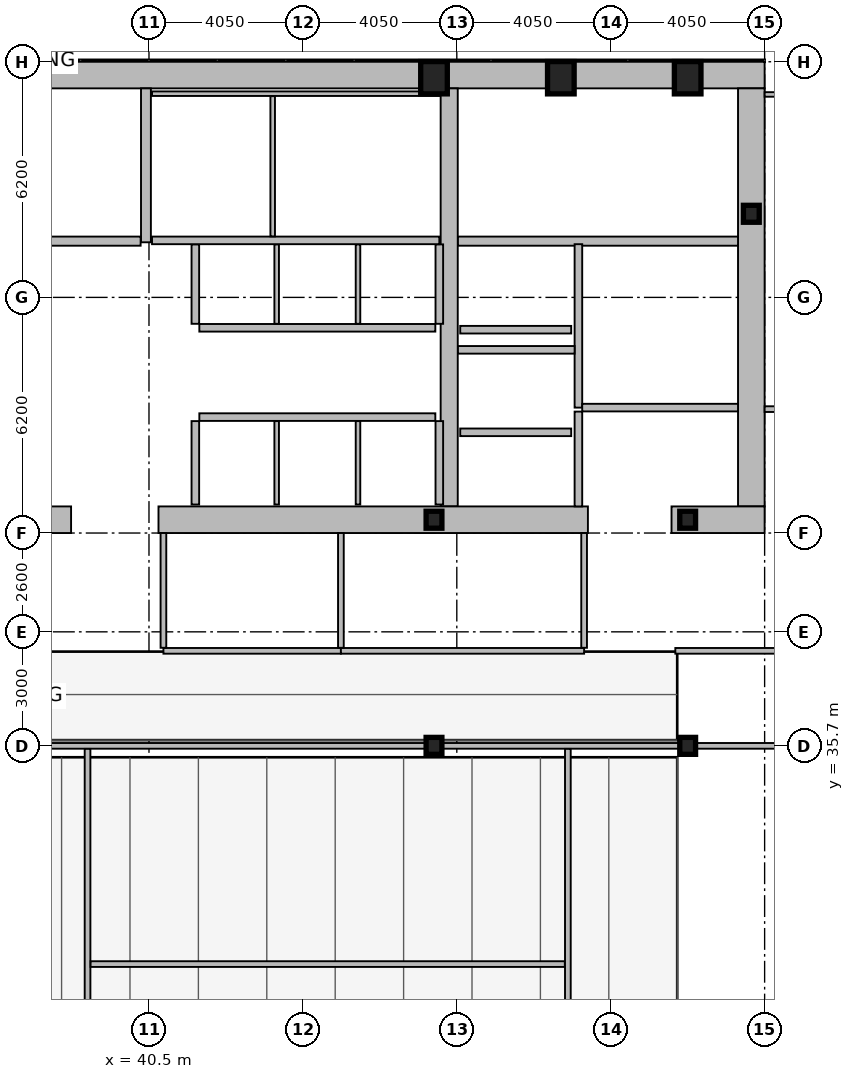
"""IFC4 building model, lengths in metres.
Left out: names, types, materials, properties, quantities, classifications, styles, units other than length and angle.
Written with IfcOpenShell. Run it as: python <this file> out.ifc"""

import sys

from ifc_helpers import new_model, si_unit, direction, frame, frame_2d, origin, origin_2d, place, context, subcontext, project, spatial, rectangle, hollow_rectangle, i_section, extrude, element, fill, save


model = new_model("IFC4")
c1 = context("Model", 3, precision=1e-05, world=origin(), true_north=direction((0.0, 1.0)))
c2 = subcontext(c1, "Body", "Model", "MODEL_VIEW")
j1 = project(units=[si_unit("LENGTHUNIT", "METRE"), si_unit("PLANEANGLEUNIT", "RADIAN")], contexts=[c1])
p1 = place(None, origin())
s1 = spatial("IfcSite", under=j1, at=p1, CompositionType="ELEMENT")
p2 = place(p1, origin())
s2 = spatial("IfcBuilding", under=s1, at=p2, CompositionType="ELEMENT")
p3 = place(p2, frame((0.0, 0.0, 154.2)))
s3 = spatial("IfcBuildingStorey", under=s2, at=p3, CompositionType="ELEMENT", Elevation=154.2)
p4 = place(p3, frame((16.2, 53.35, 0.0), z_axis=(0.0, 0.0, 1.0), x_axis=(1.0, 0.0, 0.0)))
e1 = element("IfcWall", 1, at=p4, inside=s3, PredefinedType="SHEAR", context=c2, shape_type="SweptSolid", body=[
    extrude(rectangle(XDim=40.5, YDim=0.7, at=frame_2d((20.25, 0.0))), origin(), (0.0, 0.0, 1.0), 3.44),
])
p5 = place(p3, frame((56.35, 53.0, 0.0), z_axis=(0.0, 0.0, 1.0), x_axis=(0.0, -1.0, 0.0)))
e2 = element("IfcWall", 2, at=p5, inside=s3, PredefinedType="SHEAR", context=c2, shape_type="SweptSolid", body=[
    extrude(rectangle(XDim=11.0, YDim=0.7, at=frame_2d((5.5, 0.0))), origin(), (0.0, 0.0, 1.0), 3.44),
])
p6 = place(p3, frame((48.4, 42.0, 0.0), z_axis=(0.0, 0.0, 1.0), x_axis=(0.0, 1.0, 0.0)))
e3 = element("IfcWall", 3, at=p6, inside=s3, PredefinedType="SHEAR", context=c2, shape_type="SweptSolid", body=[
    extrude(rectangle(XDim=11.0, YDim=0.45, at=frame_2d((5.5, 0.0))), origin(), (0.0, 0.0, 1.0), 3.44),
])
p7 = place(p3, frame((38.45, 41.65, 0.0), z_axis=(0.0, 0.0, 1.0), x_axis=(-1.0, 0.0, 0.0)))
e4 = element("IfcWall", 4, at=p7, inside=s3, PredefinedType="SHEAR", context=c2, shape_type="SweptSolid", body=[
    extrude(rectangle(XDim=3.75, YDim=0.7, at=frame_2d((1.875, 0.0))), origin(), (0.0, 0.0, 1.0), 3.44),
])
p8 = place(p3, frame((52.05, 41.65, 0.0), z_axis=(0.0, 0.0, 1.0), x_axis=(-1.0, 0.0, 0.0)))
e5 = element("IfcWall", 5, at=p8, inside=s3, PredefinedType="SHEAR", context=c2, shape_type="SweptSolid", body=[
    extrude(rectangle(XDim=11.3, YDim=0.7, at=frame_2d((5.65, 0.0))), origin(), (0.0, 0.0, 1.0), 3.44),
])
p9 = place(p3, frame((56.7, 41.65, 0.0), z_axis=(0.0, 0.0, 1.0), x_axis=(-1.0, 0.0, 0.0)))
e6 = element("IfcWall", 6, at=p9, inside=s3, PredefinedType="SHEAR", context=c2, shape_type="SweptSolid", body=[
    extrude(rectangle(XDim=2.45, YDim=0.7, at=frame_2d((1.225, 0.0))), origin(), (0.0, 0.0, 1.0), 3.44),
])
p10 = place(p3, frame((40.42, 48.95, 0.0), z_axis=(0.0, 0.0, 1.0), x_axis=(0.0, 1.0, 0.0)))
e7 = element("IfcWall", 7, at=p10, inside=s3, PredefinedType="SHEAR", context=c2, shape_type="SweptSolid", body=[
    extrude(rectangle(XDim=4.05, YDim=0.26, at=frame_2d((2.025, 0.0))), origin(), (0.0, 0.0, 1.0), 3.44),
])
p11 = place(p3, frame((48.63, 48.98, 0.0), z_axis=(0.0, 0.0, 1.0), x_axis=(1.0, 0.0, 0.0)))
e8 = element("IfcWall", 8, at=p11, inside=s3, PredefinedType="SHEAR", context=c2, shape_type="SweptSolid", body=[
    extrude(rectangle(XDim=7.37, YDim=0.24, at=frame_2d((3.685, 0.0))), origin(), (0.0, 0.0, 1.0), 3.44),
])
p12 = place(p11, frame((6.1, 0.0, 0.0)))
e9 = element("IfcOpeningElement", 9, at=p12, cuts=e8, PredefinedType="OPENING", context=c2, shape_type="SweptSolid", body=[
    extrude(rectangle(XDim=1.05, YDim=2.15, at=frame_2d((0.525, 1.075))), frame((0.0, 0.13, 0.0), z_axis=(0.0, -1.0, 0.0), x_axis=(1.0, 0.0, 0.0)), (0.0, 0.0, 1.0), 0.26),
])
p13 = place(p3, frame((32.72, 48.98, 0.0), z_axis=(0.0, 0.0, 1.0), x_axis=(1.0, 0.0, 0.0)))
e10 = element("IfcWall", 10, at=p13, inside=s3, PredefinedType="SHEAR", context=c2, shape_type="SweptSolid", body=[
    extrude(rectangle(XDim=7.56, YDim=0.24, at=frame_2d((3.78, 0.0))), origin(), (0.0, 0.0, 1.0), 3.44),
])
p14 = place(p13, frame((0.22, 0.0, 0.0)))
e11 = element("IfcOpeningElement", 11, at=p14, cuts=e10, PredefinedType="OPENING", context=c2, shape_type="SweptSolid", body=[
    extrude(rectangle(XDim=1.05, YDim=2.15, at=frame_2d((0.525, 1.075))), frame((0.0, 0.13, 0.0), z_axis=(0.0, -1.0, 0.0), x_axis=(1.0, 0.0, 0.0)), (0.0, 0.0, 1.0), 0.26),
])
for number, where, z_axis, x_axis in (
    (12, (48.0, 53.28, 0.0), (0.0, 0.0, 1.0), (1.0, 0.0, 0.0)),
    (13, (51.337, 53.28, 0.0), (0.0, 0.0, 1.0), (1.0, 0.0, 0.0)),
    (14, (54.675, 53.28, 0.0), (0.0, 0.0, 1.0), (1.0, 0.0, 0.0)),
):
    element("IfcColumn", number, at=place(p3, frame(where, z_axis=z_axis, x_axis=x_axis)), inside=s3, PredefinedType="COLUMN", context=c2, shape_type="SweptSolid", body=[
        extrude(hollow_rectangle(XDim=0.7, YDim=0.85, WallThickness=0.05, at=origin_2d()), origin(), (0.0, 0.0, 1.0), 3.6),
    ])
for number, where, z_axis, x_axis in (
    (15, (56.35, 49.7, 0.0), (0.0, 0.0, 1.0), (1.0, 0.0, 0.0)),
    (16, (48.0, 35.7, 0.0), (0.0, 0.0, 1.0), (1.0, 0.0, 0.0)),
    (17, (48.0, 41.65, 0.0), (0.0, 0.0, 1.0), (1.0, 0.0, 0.0)),
    (18, (54.675, 35.7, 0.0), (0.0, 0.0, 1.0), (1.0, 0.0, 0.0)),
    (19, (54.675, 41.65, 0.0), (0.0, 0.0, 1.0), (1.0, 0.0, 0.0)),
):
    element("IfcColumn", number, at=place(p3, frame(where, z_axis=z_axis, x_axis=x_axis)), inside=s3, PredefinedType="COLUMN", context=c2, shape_type="SweptSolid", body=[
        extrude(i_section(OverallWidth=0.416, OverallDepth=0.446, WebThickness=0.039, FlangeThickness=0.063, at=origin_2d()), origin(), (0.0, 0.0, 1.0), 3.6),
    ])
p15 = place(p3, frame((51.61, 43.95, 0.0), z_axis=(0.0, 0.0, 1.0), x_axis=(-1.0, 0.0, 0.0)))
e20 = element("IfcWall", 20, at=p15, inside=s3, PredefinedType="PARTITIONING", context=c2, shape_type="SweptSolid", body=[
    extrude(rectangle(XDim=2.92, YDim=0.2, at=frame_2d((1.46, 0.0))), origin(), (0.0, 0.0, 1.0), 3.44),
])
p16 = place(p15, frame((0.81, 0.0, 0.0)))
e21 = element("IfcOpeningElement", 21, at=p16, cuts=e20, PredefinedType="OPENING", context=c2, shape_type="SweptSolid", body=[
    extrude(rectangle(XDim=1.3, YDim=2.18, at=frame_2d((0.65, 1.09))), frame((0.0, 0.11, 0.0), z_axis=(0.0, -1.0, 0.0), x_axis=(1.0, 0.0, 0.0)), (0.0, 0.0, 1.0), 0.22),
])
p17 = place(p3, frame((51.61, 46.65, 0.0), z_axis=(0.0, 0.0, 1.0), x_axis=(-1.0, 0.0, 0.0)))
e22 = element("IfcWall", 22, at=p17, inside=s3, PredefinedType="PARTITIONING", context=c2, shape_type="SweptSolid", body=[
    extrude(rectangle(XDim=2.92, YDim=0.2, at=frame_2d((1.46, 0.0))), origin(), (0.0, 0.0, 1.0), 3.44),
])
p18 = place(p17, frame((0.86, 0.0, 0.0)))
e23 = element("IfcOpeningElement", 23, at=p18, cuts=e22, PredefinedType="OPENING", context=c2, shape_type="SweptSolid", body=[
    extrude(rectangle(XDim=1.2, YDim=2.18, at=frame_2d((0.6, 1.09))), frame((0.0, 0.11, 0.0), z_axis=(0.0, -1.0, 0.0), x_axis=(1.0, 0.0, 0.0)), (0.0, 0.0, 1.0), 0.22),
])
p19 = place(p3, frame((51.8, 44.6, 0.0), z_axis=(0.0, 0.0, 1.0), x_axis=(0.0, 1.0, 0.0)))
e24 = element("IfcWall", 24, at=p19, inside=s3, PredefinedType="PARTITIONING", context=c2, shape_type="SweptSolid", body=[
    extrude(rectangle(XDim=4.3, YDim=0.2, at=frame_2d((2.15, 0.0))), origin(), (0.0, 0.0, 1.0), 3.44),
])
p20 = place(p3, frame((51.9, 44.6, 0.0), z_axis=(0.0, 0.0, 1.0), x_axis=(1.0, 0.0, 0.0)))
e25 = element("IfcWall", 25, at=p20, inside=s3, PredefinedType="PARTITIONING", context=c2, shape_type="SweptSolid", body=[
    extrude(rectangle(XDim=4.1, YDim=0.2, at=frame_2d((2.05, 0.0))), origin(), (0.0, 0.0, 1.0), 3.44),
])
p21 = place(p20, frame((1.15, 0.0, 0.0)))
e26 = element("IfcOpeningElement", 26, at=p21, cuts=e25, PredefinedType="OPENING", context=c2, shape_type="SweptSolid", body=[
    extrude(rectangle(XDim=1.05, YDim=2.15, at=frame_2d((0.525, 1.075))), frame((0.0, 0.11, 0.0), z_axis=(0.0, -1.0, 0.0), x_axis=(1.0, 0.0, 0.0)), (0.0, 0.0, 1.0), 0.22),
])
p22 = place(p3, frame((48.63, 46.12, 0.0), z_axis=(0.0, 0.0, 1.0), x_axis=(1.0, 0.0, 0.0)))
e27 = element("IfcWall", 27, at=p22, inside=s3, PredefinedType="PARTITIONING", context=c2, shape_type="SweptSolid", body=[
    extrude(rectangle(XDim=3.07, YDim=0.2, at=frame_2d((1.535, 0.0))), origin(), (0.0, 0.0, 1.0), 3.44),
])
p23 = place(p3, frame((51.8, 42.0, 0.0), z_axis=(0.0, 0.0, 1.0), x_axis=(0.0, 1.0, 0.0)))
e28 = element("IfcWall", 28, at=p23, inside=s3, PredefinedType="PARTITIONING", context=c2, shape_type="SweptSolid", body=[
    extrude(rectangle(XDim=2.495, YDim=0.2, at=frame_2d((1.248, 0.0))), origin(), (0.0, 0.0, 1.0), 3.44),
])
p24 = place(p23, frame((0.38, 0.0, 0.0)))
e29 = element("IfcOpeningElement", 29, at=p24, cuts=e28, PredefinedType="OPENING", context=c2, shape_type="SweptSolid", body=[
    extrude(rectangle(XDim=1.05, YDim=2.15, at=frame_2d((0.525, 1.075))), frame((0.0, 0.11, 0.0), z_axis=(0.0, -1.0, 0.0), x_axis=(1.0, 0.0, 0.0)), (0.0, 0.0, 1.0), 0.22),
])
p25 = place(p3, frame((41.825, 46.7, 0.0), z_axis=(0.0, 0.0, 1.0), x_axis=(1.0, 0.0, 0.0)))
e30 = element("IfcWall", 30, at=p25, inside=s3, PredefinedType="PARTITIONING", context=c2, shape_type="SweptSolid", body=[
    extrude(rectangle(XDim=6.21, YDim=0.2, at=frame_2d((3.105, 0.0))), origin(), (0.0, 0.0, 1.0), 3.44),
])
for number, where, z_axis, x_axis in (
    (31, (41.72, 46.805, 0.0), (0.0, 0.0, 1.0), (0.0, 1.0, 0.0)),
    (32, (48.14, 46.805, 0.0), (0.0, 0.0, 1.0), (0.0, 1.0, 0.0)),
):
    element("IfcWall", number, at=place(p3, frame(where, z_axis=z_axis, x_axis=x_axis)), inside=s3, PredefinedType="PARTITIONING", context=c2, shape_type="SweptSolid", body=[
        extrude(rectangle(XDim=2.09, YDim=0.2, at=frame_2d((1.045, 0.0))), origin(), (0.0, 0.0, 1.0), 3.44),
    ])
for number, where, z_axis, x_axis in (
    (33, (43.86, 46.805, 0.0), (0.0, 0.0, 1.0), (0.0, 1.0, 0.0)),
    (34, (46.0, 46.805, 0.0), (0.0, 0.0, 1.0), (0.0, 1.0, 0.0)),
):
    element("IfcWall", number, at=place(p3, frame(where, z_axis=z_axis, x_axis=x_axis)), inside=s3, PredefinedType="PARTITIONING", context=c2, shape_type="SweptSolid", body=[
        extrude(rectangle(XDim=2.09, YDim=0.12, at=frame_2d((1.045, 0.0))), origin(), (0.0, 0.0, 1.0), 3.44),
    ])
p26 = place(p3, frame((41.825, 44.35, 0.0), z_axis=(0.0, 0.0, 1.0), x_axis=(1.0, 0.0, 0.0)))
e35 = element("IfcWall", 35, at=p26, inside=s3, PredefinedType="PARTITIONING", context=c2, shape_type="SweptSolid", body=[
    extrude(rectangle(XDim=6.21, YDim=0.2, at=frame_2d((3.105, 0.0))), origin(), (0.0, 0.0, 1.0), 3.44),
])
for number, where, z_axis, x_axis in (
    (36, (41.72, 42.05, 0.0), (0.0, 0.0, 1.0), (0.0, 1.0, 0.0)),
    (37, (48.14, 42.05, 0.0), (0.0, 0.0, 1.0), (0.0, 1.0, 0.0)),
):
    element("IfcWall", number, at=place(p3, frame(where, z_axis=z_axis, x_axis=x_axis)), inside=s3, PredefinedType="PARTITIONING", context=c2, shape_type="SweptSolid", body=[
        extrude(rectangle(XDim=2.195, YDim=0.2, at=frame_2d((1.098, 0.0))), origin(), (0.0, 0.0, 1.0), 3.44),
    ])
for number, where, z_axis, x_axis in (
    (38, (43.86, 42.05, 0.0), (0.0, 0.0, 1.0), (0.0, 1.0, 0.0)),
    (39, (46.0, 42.05, 0.0), (0.0, 0.0, 1.0), (0.0, 1.0, 0.0)),
):
    element("IfcWall", number, at=place(p3, frame(where, z_axis=z_axis, x_axis=x_axis)), inside=s3, PredefinedType="PARTITIONING", context=c2, shape_type="SweptSolid", body=[
        extrude(rectangle(XDim=2.195, YDim=0.12, at=frame_2d((1.098, 0.0))), origin(), (0.0, 0.0, 1.0), 3.44),
    ])
p27 = place(p3, frame((40.58, 52.86, 0.0), z_axis=(0.0, 0.0, 1.0), x_axis=(1.0, 0.0, 0.0)))
e40 = element("IfcWall", 40, at=p27, inside=s3, PredefinedType="PARTITIONING", context=c2, shape_type="SweptSolid", body=[
    extrude(rectangle(XDim=7.56, YDim=0.12, at=frame_2d((3.78, 0.0))), origin(), (0.0, 0.0, 1.0), 3.44),
])
p28 = place(p3, frame((40.58, 49.0, 0.0), z_axis=(0.0, 0.0, 1.0), x_axis=(1.0, 0.0, 0.0)))
e41 = element("IfcWall", 41, at=p28, inside=s3, PredefinedType="PARTITIONING", context=c2, shape_type="SweptSolid", body=[
    extrude(rectangle(XDim=7.56, YDim=0.2, at=frame_2d((3.78, 0.0))), origin(), (0.0, 0.0, 1.0), 3.44),
])
p29 = place(p28, frame((0.16, 0.0, 0.0)))
e42 = element("IfcOpeningElement", 42, at=p29, cuts=e41, PredefinedType="OPENING", context=c2, shape_type="SweptSolid", body=[
    extrude(rectangle(XDim=0.95, YDim=2.1, at=frame_2d((0.475, 1.05))), frame((0.0, 0.11, 0.0), z_axis=(0.0, -1.0, 0.0), x_axis=(1.0, 0.0, 0.0)), (0.0, 0.0, 1.0), 0.22),
])
p30 = place(p3, frame((43.755, 49.105, 0.0), z_axis=(0.0, 0.0, 1.0), x_axis=(0.0, 1.0, 0.0)))
e43 = element("IfcWall", 43, at=p30, inside=s3, PredefinedType="PARTITIONING", context=c2, shape_type="SweptSolid", body=[
    extrude(rectangle(XDim=3.69, YDim=0.12, at=frame_2d((1.845, 0.0))), origin(), (0.0, 0.0, 1.0), 3.44),
])
p31 = place(p30, frame((1.05, 0.0, 0.0)))
e44 = element("IfcOpeningElement", 44, at=p31, cuts=e43, PredefinedType="OPENING", context=c2, shape_type="SweptSolid", body=[
    extrude(rectangle(XDim=0.9, YDim=2.05, at=frame_2d((0.45, 1.025))), frame((0.0, 0.07, 0.0), z_axis=(0.0, -1.0, 0.0), x_axis=(1.0, 0.0, 0.0)), (0.0, 0.0, 1.0), 0.14),
])
p32 = place(p3, frame((40.88, 38.2, 0.0), z_axis=(0.0, 0.0, 1.0), x_axis=(1.0, 0.0, 0.0)))
e45 = element("IfcWall", 45, at=p32, inside=s3, PredefinedType="PARTITIONING", context=c2, shape_type="SweptSolid", body=[
    extrude(rectangle(XDim=4.67, YDim=0.15, at=frame_2d((2.335, 0.0))), origin(), (0.0, 0.0, 1.0), 2.73),
])
p33 = place(p32, frame((1.1, 0.0, 0.0)))
e46 = element("IfcOpeningElement", 46, at=p33, cuts=e45, PredefinedType="OPENING", context=c2, shape_type="SweptSolid", body=[
    extrude(rectangle(XDim=0.9, YDim=2.05, at=frame_2d((0.45, 1.025))), frame((0.0, 0.085, 0.0), z_axis=(0.0, -1.0, 0.0), x_axis=(1.0, 0.0, 0.0)), (0.0, 0.0, 1.0), 0.17),
])
p34 = place(p3, frame((45.55, 38.2, 0.0), z_axis=(0.0, 0.0, 1.0), x_axis=(1.0, 0.0, 0.0)))
e47 = element("IfcWall", 47, at=p34, inside=s3, PredefinedType="PARTITIONING", context=c2, shape_type="SweptSolid", body=[
    extrude(rectangle(XDim=6.4, YDim=0.15, at=frame_2d((3.2, 0.0))), origin(), (0.0, 0.0, 1.0), 2.73),
])
p35 = place(p34, frame((1.1, 0.0, 0.0)))
e48 = element("IfcOpeningElement", 48, at=p35, cuts=e47, PredefinedType="OPENING", context=c2, shape_type="SweptSolid", body=[
    extrude(rectangle(XDim=1.0, YDim=2.05, at=frame_2d((0.5, 1.025))), frame((0.0, 0.085, 0.0), z_axis=(0.0, -1.0, 0.0), x_axis=(1.0, 0.0, 0.0)), (0.0, 0.0, 1.0), 0.17),
])
for number, where, z_axis, x_axis in (
    (49, (40.88, 38.28, 0.0), (0.0, 0.0, 1.0), (0.0, 1.0, 0.0)),
    (50, (45.55, 38.28, 0.0), (0.0, 0.0, 1.0), (0.0, 1.0, 0.0)),
    (51, (51.95, 38.28, 0.0), (0.0, 0.0, 1.0), (0.0, 1.0, 0.0)),
):
    element("IfcWall", number, at=place(p3, frame(where, z_axis=z_axis, x_axis=x_axis)), inside=s3, PredefinedType="PARTITIONING", context=c2, shape_type="SweptSolid", body=[
        extrude(rectangle(XDim=3.02, YDim=0.15, at=frame_2d((1.51, 0.0))), origin(), (0.0, 0.0, 1.0), 3.44),
    ])
p36 = place(p3, frame((54.35, 38.2, 0.0), z_axis=(0.0, 0.0, 1.0), x_axis=(1.0, 0.0, 0.0)))
e52 = element("IfcWall", 52, at=p36, inside=s3, PredefinedType="PARTITIONING", context=c2, shape_type="SweptSolid", body=[
    extrude(rectangle(XDim=12.52, YDim=0.15, at=frame_2d((6.26, 0.0))), origin(), (0.0, 0.0, 1.0), 2.73),
])
p37 = place(p36, frame((3.25, 0.0, 0.0)))
e53 = element("IfcOpeningElement", 53, at=p37, cuts=e52, PredefinedType="OPENING", context=c2, shape_type="SweptSolid", body=[
    extrude(rectangle(XDim=0.95, YDim=2.05, at=frame_2d((0.475, 1.025))), frame((0.0, 0.085, 0.0), z_axis=(0.0, -1.0, 0.0), x_axis=(1.0, 0.0, 0.0)), (0.0, 0.0, 1.0), 0.17),
])
p38 = place(p3, frame((56.7, 44.56, 0.0), z_axis=(0.0, 0.0, 1.0), x_axis=(1.0, 0.0, 0.0)))
e54 = element("IfcWall", 54, at=p38, inside=s3, PredefinedType="PARTITIONING", context=c2, shape_type="SweptSolid", body=[
    extrude(rectangle(XDim=10.105, YDim=0.15, at=frame_2d((5.052, 0.0))), origin(), (0.0, 0.0, 1.0), 2.83),
])
p39 = place(p38, frame((0.9, 0.0, 0.0)))
e55 = element("IfcOpeningElement", 55, at=p39, cuts=e54, PredefinedType="OPENING", context=c2, shape_type="SweptSolid", body=[
    extrude(rectangle(XDim=0.9, YDim=2.05, at=frame_2d((0.45, 1.025))), frame((0.0, 0.085, 0.0), z_axis=(0.0, -1.0, 0.0), x_axis=(1.0, 0.0, 0.0)), (0.0, 0.0, 1.0), 0.17),
])
p40 = place(p3, frame((21.81, 35.7, 0.0), z_axis=(0.0, 0.0, 1.0), x_axis=(1.0, 0.0, 0.0)))
e56 = element("IfcWall", 56, at=p40, inside=s3, PredefinedType="PARTITIONING", context=c2, shape_type="SweptSolid", body=[
    extrude(rectangle(XDim=44.995, YDim=0.15, at=frame_2d((22.498, 0.0))), origin(), (0.0, 0.0, 1.0), 2.73),
])
p41 = place(p3, frame((38.883, 22.735, 0.0), z_axis=(0.0, 0.0, 1.0), x_axis=(0.0, 1.0, 0.0)))
e57 = element("IfcWall", 57, at=p41, inside=s3, PredefinedType="PARTITIONING", context=c2, shape_type="SweptSolid", body=[
    extrude(rectangle(XDim=12.885, YDim=0.15, at=frame_2d((6.442, 0.0))), origin(), (0.0, 0.0, 1.0), 2.93),
])
p42 = place(p3, frame((38.963, 29.958, 0.0), z_axis=(0.0, 0.0, 1.0), x_axis=(1.0, 0.0, 0.0)))
e58 = element("IfcWall", 58, at=p42, inside=s3, PredefinedType="PARTITIONING", context=c2, shape_type="SweptSolid", body=[
    extrude(rectangle(XDim=12.479, YDim=0.15, at=frame_2d((6.24, 0.0))), origin(), (0.0, 0.0, 1.0), 2.73),
])
p43 = place(p42, frame((5.688, 0.0, 0.0)))
e59 = element("IfcOpeningElement", 59, at=p43, cuts=e58, PredefinedType="OPENING", context=c2, shape_type="SweptSolid", body=[
    extrude(rectangle(XDim=0.9, YDim=2.05, at=frame_2d((0.45, 1.025))), frame((0.0, 0.085, 0.0), z_axis=(0.0, -1.0, 0.0), x_axis=(1.0, 0.0, 0.0)), (0.0, 0.0, 1.0), 0.17),
])
p44 = place(p3, frame((51.522, 22.735, 0.0), z_axis=(0.0, 0.0, 1.0), x_axis=(0.0, 1.0, 0.0)))
e60 = element("IfcWall", 60, at=p44, inside=s3, PredefinedType="PARTITIONING", context=c2, shape_type="SweptSolid", body=[
    extrude(rectangle(XDim=12.885, YDim=0.15, at=frame_2d((6.442, 0.0))), origin(), (0.0, 0.0, 1.0), 2.93),
])
p45 = place(p3, frame((56.7, 52.84, 0.0), z_axis=(0.0, 0.0, 1.0), x_axis=(1.0, 0.0, 0.0)))
e61 = element("IfcWall", 61, at=p45, inside=s3, PredefinedType="PARTITIONING", context=c2, shape_type="SweptSolid", body=[
    extrude(rectangle(XDim=10.105, YDim=0.12, at=frame_2d((5.052, 0.0))), origin(), (0.0, 0.0, 1.0), 3.44),
])
p46 = place(p12, origin())
e62 = element("IfcDoor", 62, at=p46, inside=s3, OperationType="SINGLE_SWING_RIGHT", PredefinedType="DOOR", context=c2, shape_type="SweptSolid", body=[
    extrude(rectangle(XDim=1.05, YDim=2.15, at=frame_2d((0.525, 1.075))), frame((0.0, 0.025, 0.0), z_axis=(0.0, -1.0, 0.0), x_axis=(1.0, 0.0, 0.0)), (0.0, 0.0, 1.0), 0.05),
])
fill(e9, e62)
p47 = place(p16, origin())
e63 = element("IfcDoor", 63, at=p47, inside=s3, OperationType="SLIDING_TO_LEFT", PredefinedType="DOOR", context=c2, shape_type="SweptSolid", body=[
    extrude(rectangle(XDim=1.3, YDim=2.18, at=frame_2d((0.65, 1.09))), frame((0.0, 0.025, 0.0), z_axis=(0.0, -1.0, 0.0), x_axis=(1.0, 0.0, 0.0)), (0.0, 0.0, 1.0), 0.05),
])
fill(e21, e63)
p48 = place(p18, origin())
e64 = element("IfcDoor", 64, at=p48, inside=s3, OperationType="SLIDING_TO_LEFT", PredefinedType="DOOR", context=c2, shape_type="SweptSolid", body=[
    extrude(rectangle(XDim=1.2, YDim=2.18, at=frame_2d((0.6, 1.09))), frame((0.0, 0.025, 0.0), z_axis=(0.0, -1.0, 0.0), x_axis=(1.0, 0.0, 0.0)), (0.0, 0.0, 1.0), 0.05),
])
fill(e23, e64)
p49 = place(p21, origin())
e65 = element("IfcDoor", 65, at=p49, inside=s3, OperationType="SINGLE_SWING_LEFT", PredefinedType="DOOR", context=c2, shape_type="SweptSolid", body=[
    extrude(rectangle(XDim=1.05, YDim=2.15, at=frame_2d((0.525, 1.075))), frame((0.0, 0.025, 0.0), z_axis=(0.0, -1.0, 0.0), x_axis=(1.0, 0.0, 0.0)), (0.0, 0.0, 1.0), 0.05),
])
fill(e26, e65)
p50 = place(p24, origin())
e66 = element("IfcDoor", 66, at=p50, inside=s3, OperationType="SINGLE_SWING_RIGHT", PredefinedType="DOOR", context=c2, shape_type="SweptSolid", body=[
    extrude(rectangle(XDim=1.05, YDim=2.15, at=frame_2d((0.525, 1.075))), frame((0.0, 0.025, 0.0), z_axis=(0.0, -1.0, 0.0), x_axis=(1.0, 0.0, 0.0)), (0.0, 0.0, 1.0), 0.05),
])
fill(e29, e66)
p51 = place(p29, origin())
e67 = element("IfcDoor", 67, at=p51, inside=s3, OperationType="SINGLE_SWING_LEFT", PredefinedType="DOOR", context=c2, shape_type="SweptSolid", body=[
    extrude(rectangle(XDim=0.95, YDim=2.1, at=frame_2d((0.475, 1.05))), frame((0.0, 0.025, 0.0), z_axis=(0.0, -1.0, 0.0), x_axis=(1.0, 0.0, 0.0)), (0.0, 0.0, 1.0), 0.05),
])
fill(e42, e67)
p52 = place(p31, origin())
e68 = element("IfcDoor", 68, at=p52, inside=s3, OperationType="SINGLE_SWING_RIGHT", PredefinedType="DOOR", context=c2, shape_type="SweptSolid", body=[
    extrude(rectangle(XDim=0.9, YDim=2.05, at=frame_2d((0.45, 1.025))), frame((0.0, 0.025, 0.0), z_axis=(0.0, -1.0, 0.0), x_axis=(1.0, 0.0, 0.0)), (0.0, 0.0, 1.0), 0.05),
])
fill(e44, e68)
p53 = place(p33, origin())
e69 = element("IfcDoor", 69, at=p53, inside=s3, OperationType="SINGLE_SWING_RIGHT", PredefinedType="DOOR", context=c2, shape_type="SweptSolid", body=[
    extrude(rectangle(XDim=0.9, YDim=2.05, at=frame_2d((0.45, 1.025))), frame((0.0, 0.025, 0.0), z_axis=(0.0, -1.0, 0.0), x_axis=(1.0, 0.0, 0.0)), (0.0, 0.0, 1.0), 0.05),
])
fill(e46, e69)
p54 = place(p35, origin())
e70 = element("IfcDoor", 70, at=p54, inside=s3, OperationType="SINGLE_SWING_LEFT", PredefinedType="DOOR", context=c2, shape_type="SweptSolid", body=[
    extrude(rectangle(XDim=1.0, YDim=2.05, at=frame_2d((0.5, 1.025))), frame((0.0, 0.025, 0.0), z_axis=(0.0, -1.0, 0.0), x_axis=(1.0, 0.0, 0.0)), (0.0, 0.0, 1.0), 0.05),
])
fill(e48, e70)
p55 = place(p43, origin())
e71 = element("IfcDoor", 71, at=p55, inside=s3, OperationType="SINGLE_SWING_LEFT", PredefinedType="DOOR", context=c2, shape_type="SweptSolid", body=[
    extrude(rectangle(XDim=0.9, YDim=2.05, at=frame_2d((0.45, 1.025))), frame((0.0, 0.025, 0.0), z_axis=(0.0, -1.0, 0.0), x_axis=(1.0, 0.0, 0.0)), (0.0, 0.0, 1.0), 0.05),
])
fill(e59, e71)
save(model, sys.argv[1])
